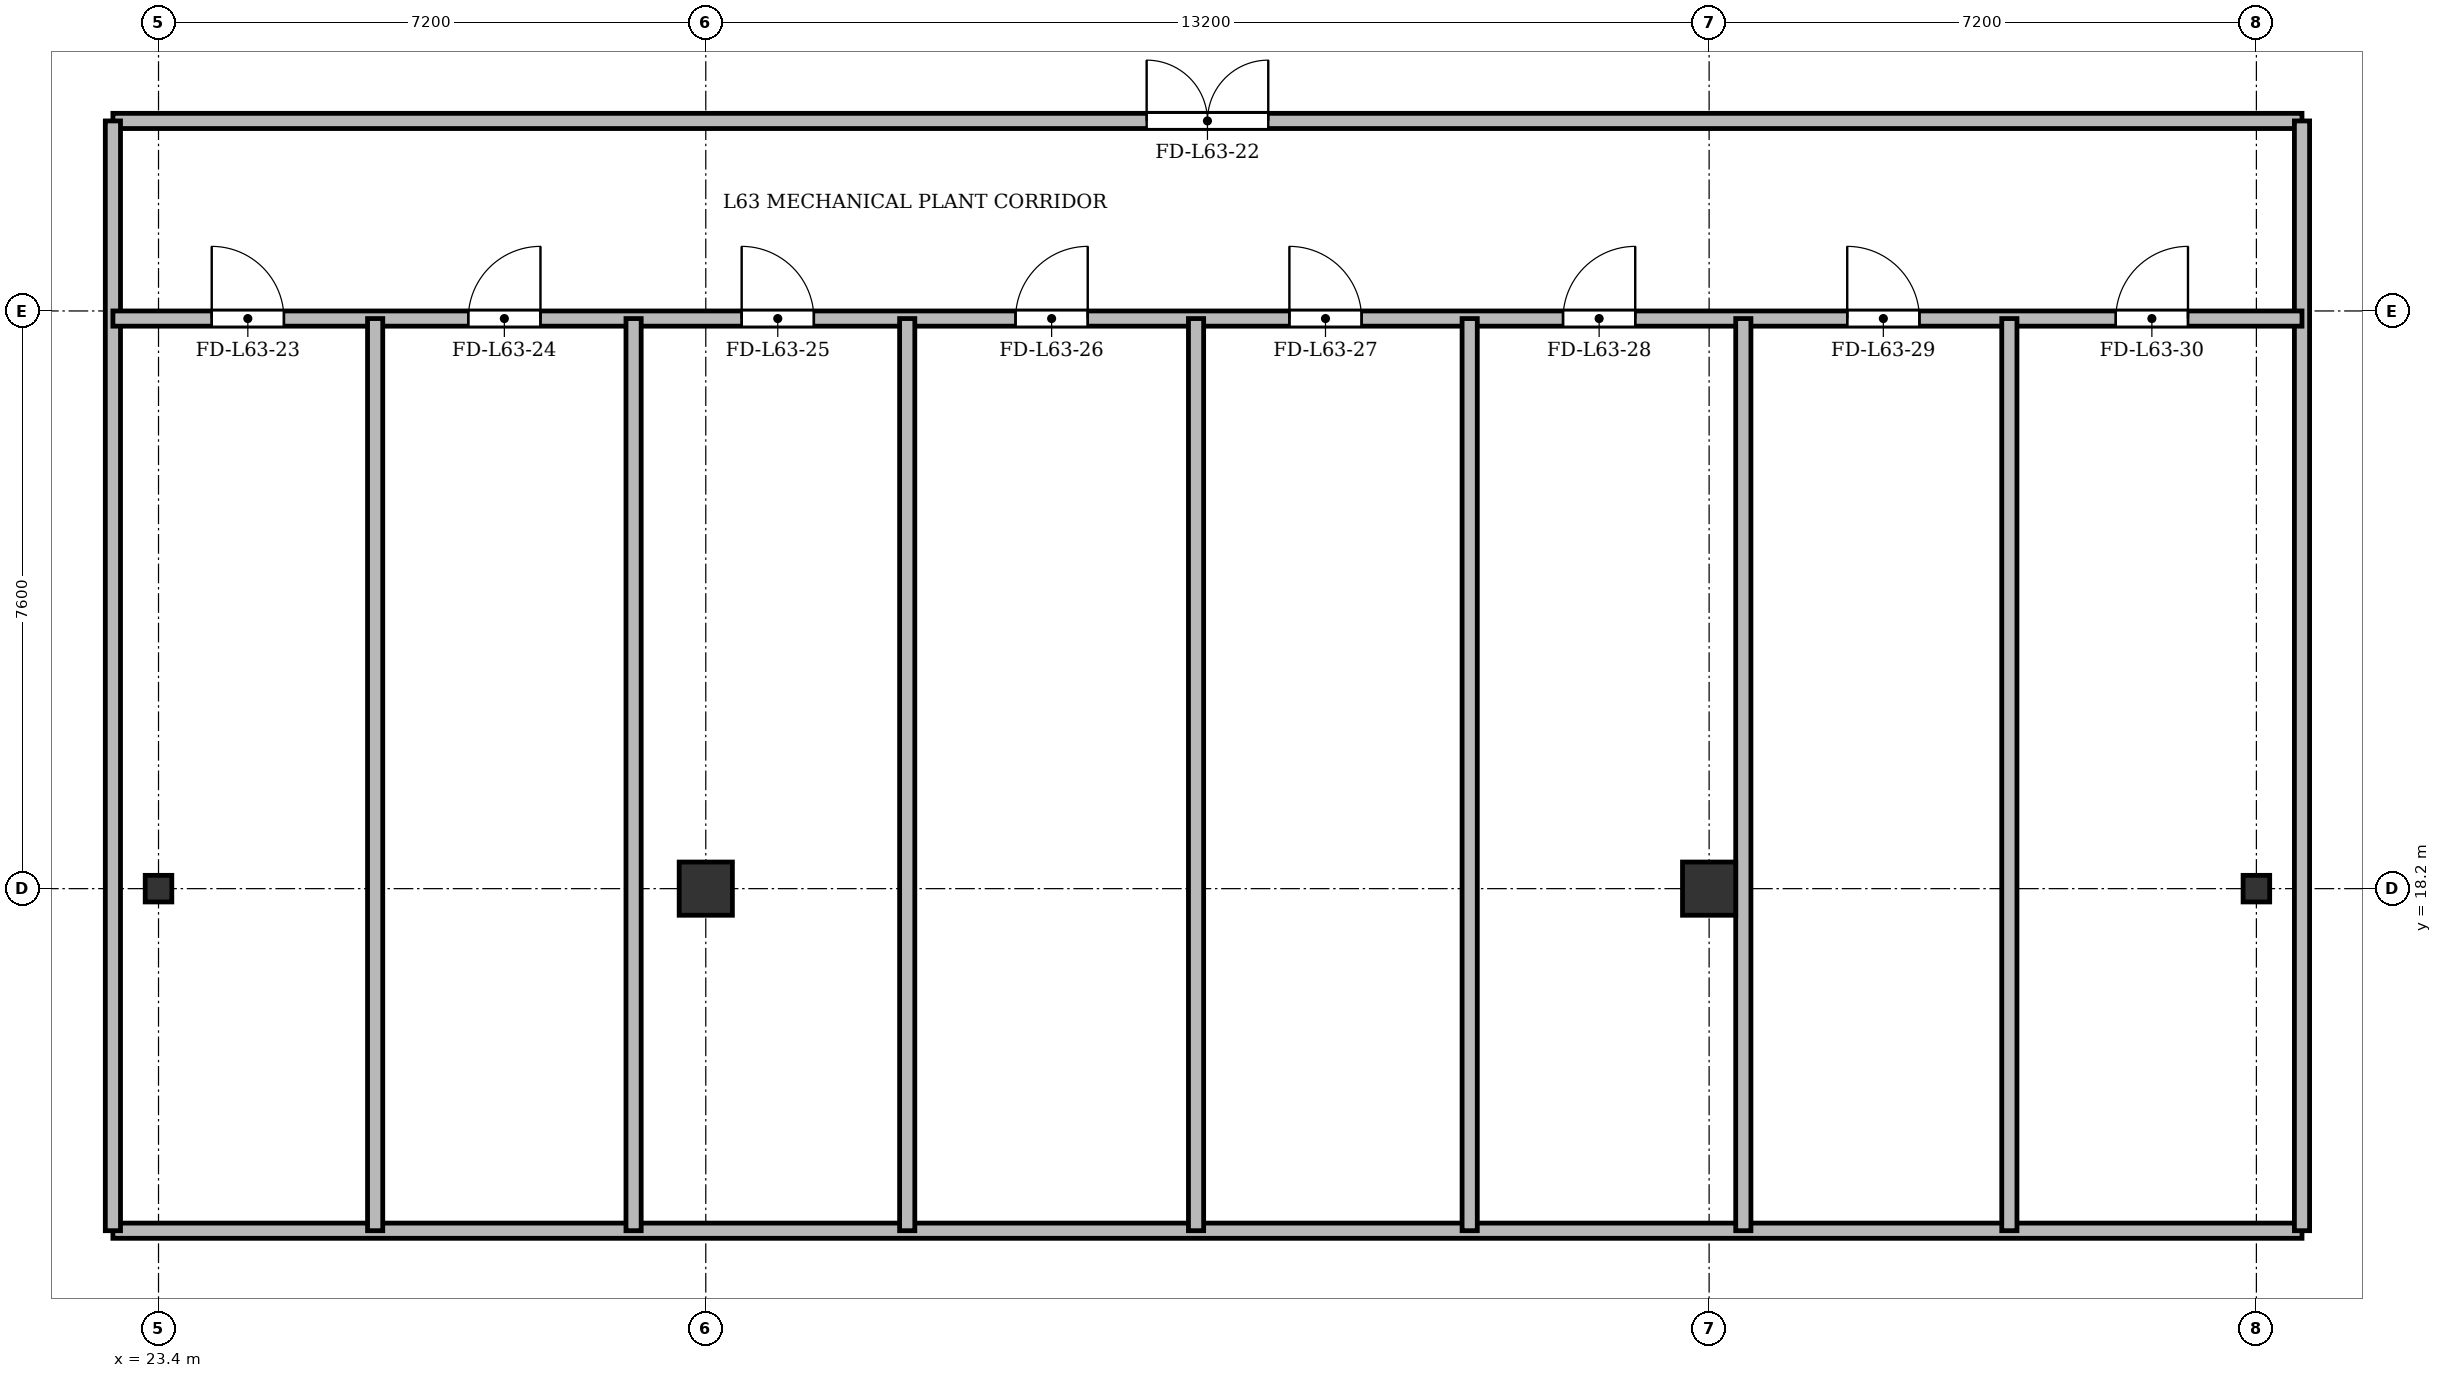
"""IFC4 building model, lengths in metres.
Left out: names, types, materials, properties, quantities, classifications, styles, units other than length and angle.
Written with IfcOpenShell. Run it as: python <this file> out.ifc"""

import sys

from ifc_helpers import new_model, si_unit, direction, frame, frame_2d, origin, origin_2d, place, context, subcontext, project, spatial, rectangle, i_section, extrude, source, transform, mapped, element, fill, save


model = new_model("IFC4")
c1 = context("Model", 3, precision=1e-05, world=origin(), true_north=direction((0.0, 1.0)))
c2 = subcontext(c1, "Body", "Model", "MODEL_VIEW")
j1 = project(units=[si_unit("LENGTHUNIT", "METRE"), si_unit("PLANEANGLEUNIT", "RADIAN")], contexts=[c1])
p1 = place(None, origin())
s1 = spatial("IfcSite", under=j1, at=p1, CompositionType="ELEMENT")
p2 = place(p1, origin())
s2 = spatial("IfcBuilding", under=s1, at=p2, CompositionType="ELEMENT")
p3 = place(p2, frame((0.0, 0.0, 240.9)))
s3 = spatial("IfcBuildingStorey", under=s2, at=p3, CompositionType="ELEMENT", Elevation=240.9)
m1 = source(origin(), c2, "Body", "SweptSolid", [
    extrude(i_section(OverallWidth=0.35, OverallDepth=0.35, WebThickness=0.018, FlangeThickness=0.028, at=origin_2d()), origin(), (0.0, 0.0, 1.0), 7.8),
])
p4 = place(p3, frame((23.4, 18.2, 0.0), z_axis=(0.0, 0.0, 1.0), x_axis=(1.0, 0.0, 0.0)))
e1 = element("IfcColumn", 1, at=p4, inside=s3, PredefinedType="COLUMN", context=c2, shape_type="MappedRepresentation", body=[
    mapped(m1, transform((0.0, 0.0, 0.0), x_axis=(1.0, 0.0, 0.0), y_axis=(0.0, 1.0, 0.0), z_axis=(0.0, 0.0, 1.0), scale=1.0)),
])
m2 = source(origin(), c2, "Body", "SweptSolid", [
    extrude(rectangle(XDim=0.7, YDim=0.7, at=origin_2d()), origin(), (0.0, 0.0, 1.0), 7.8),
])
for number, where, z_axis, x_axis in (
    (2, (30.6, 18.2, 0.0), (0.0, 0.0, 1.0), (1.0, 0.0, 0.0)),
    (3, (43.8, 18.2, 0.0), (0.0, 0.0, 1.0), (1.0, 0.0, 0.0)),
):
    element("IfcColumn", number, at=place(p3, frame(where, z_axis=z_axis, x_axis=x_axis)), inside=s3, PredefinedType="COLUMN", context=c2, shape_type="MappedRepresentation", body=[
        mapped(m2, transform((0.0, 0.0, 0.0), x_axis=(1.0, 0.0, 0.0), y_axis=(0.0, 1.0, 0.0), z_axis=(0.0, 0.0, 1.0), scale=1.0)),
    ])
p5 = place(p3, frame((51.0, 18.2, 0.0), z_axis=(0.0, 0.0, 1.0), x_axis=(1.0, 0.0, 0.0)))
e4 = element("IfcColumn", 4, at=p5, inside=s3, PredefinedType="COLUMN", context=c2, shape_type="MappedRepresentation", body=[
    mapped(m1, transform((0.0, 0.0, 0.0), x_axis=(1.0, 0.0, 0.0), y_axis=(0.0, 1.0, 0.0), z_axis=(0.0, 0.0, 1.0), scale=1.0)),
])
p6 = place(p3, frame((22.8, 28.3, 0.0), z_axis=(0.0, 0.0, 1.0), x_axis=(1.0, 0.0, 0.0)))
e5 = element("IfcWall", 5, at=p6, inside=s3, PredefinedType="PARTITIONING", context=c2, shape_type="SweptSolid", body=[
    extrude(rectangle(XDim=28.8, YDim=0.2, at=frame_2d((14.4, 0.0))), origin(), (0.0, 0.0, 1.0), 6.94),
])
p7 = place(p6, frame((13.6, 0.0, 0.0)))
e6 = element("IfcOpeningElement", 6, at=p7, cuts=e5, PredefinedType="OPENING", context=c2, shape_type="SweptSolid", body=[
    extrude(rectangle(XDim=1.6, YDim=2.2, at=frame_2d((0.8, 1.1))), frame((0.0, 0.11, 0.0), z_axis=(0.0, -1.0, 0.0), x_axis=(1.0, 0.0, 0.0)), (0.0, 0.0, 1.0), 0.22),
])
p8 = place(p3, frame((22.8, 13.7, 0.0), z_axis=(0.0, 0.0, 1.0), x_axis=(1.0, 0.0, 0.0)))
e7 = element("IfcWall", 7, at=p8, inside=s3, PredefinedType="PARTITIONING", context=c2, shape_type="SweptSolid", body=[
    extrude(rectangle(XDim=28.8, YDim=0.2, at=frame_2d((14.4, 0.0))), origin(), (0.0, 0.0, 1.0), 6.94),
])
for number, where, z_axis, x_axis in (
    (8, (22.8, 13.7, 0.0), (0.0, 0.0, 1.0), (0.0, 1.0, 0.0)),
    (9, (51.6, 13.7, 0.0), (0.0, 0.0, 1.0), (0.0, 1.0, 0.0)),
):
    element("IfcWall", number, at=place(p3, frame(where, z_axis=z_axis, x_axis=x_axis)), inside=s3, PredefinedType="PARTITIONING", context=c2, shape_type="SweptSolid", body=[
        extrude(rectangle(XDim=14.6, YDim=0.2, at=frame_2d((7.3, 0.0))), origin(), (0.0, 0.0, 1.0), 6.99),
    ])
p9 = place(p3, frame((22.8, 25.7, 0.0), z_axis=(0.0, 0.0, 1.0), x_axis=(1.0, 0.0, 0.0)))
e10 = element("IfcWall", 10, at=p9, inside=s3, PredefinedType="PARTITIONING", context=c2, shape_type="SweptSolid", body=[
    extrude(rectangle(XDim=28.8, YDim=0.2, at=frame_2d((14.4, 0.0))), origin(), (0.0, 0.0, 1.0), 6.94),
])
p10 = place(p9, frame((1.3, 0.0, 0.0)))
e11 = element("IfcOpeningElement", 11, at=p10, cuts=e10, PredefinedType="OPENING", context=c2, shape_type="SweptSolid", body=[
    extrude(rectangle(XDim=0.95, YDim=2.15, at=frame_2d((0.475, 1.075))), frame((0.0, 0.11, 0.0), z_axis=(0.0, -1.0, 0.0), x_axis=(1.0, 0.0, 0.0)), (0.0, 0.0, 1.0), 0.22),
])
p11 = place(p9, frame((4.675, 0.0, 0.0)))
e12 = element("IfcOpeningElement", 12, at=p11, cuts=e10, PredefinedType="OPENING", context=c2, shape_type="SweptSolid", body=[
    extrude(rectangle(XDim=0.95, YDim=2.15, at=frame_2d((0.475, 1.075))), frame((0.0, 0.11, 0.0), z_axis=(0.0, -1.0, 0.0), x_axis=(1.0, 0.0, 0.0)), (0.0, 0.0, 1.0), 0.22),
])
p12 = place(p9, frame((8.272, 0.0, 0.0)))
e13 = element("IfcOpeningElement", 13, at=p12, cuts=e10, PredefinedType="OPENING", context=c2, shape_type="SweptSolid", body=[
    extrude(rectangle(XDim=0.95, YDim=2.15, at=frame_2d((0.475, 1.075))), frame((0.0, 0.11, 0.0), z_axis=(0.0, -1.0, 0.0), x_axis=(1.0, 0.0, 0.0)), (0.0, 0.0, 1.0), 0.22),
])
p13 = place(p9, frame((11.875, 0.0, 0.0)))
e14 = element("IfcOpeningElement", 14, at=p13, cuts=e10, PredefinedType="OPENING", context=c2, shape_type="SweptSolid", body=[
    extrude(rectangle(XDim=0.95, YDim=2.15, at=frame_2d((0.475, 1.075))), frame((0.0, 0.11, 0.0), z_axis=(0.0, -1.0, 0.0), x_axis=(1.0, 0.0, 0.0)), (0.0, 0.0, 1.0), 0.22),
])
p14 = place(p9, frame((15.478, 0.0, 0.0)))
e15 = element("IfcOpeningElement", 15, at=p14, cuts=e10, PredefinedType="OPENING", context=c2, shape_type="SweptSolid", body=[
    extrude(rectangle(XDim=0.95, YDim=2.15, at=frame_2d((0.475, 1.075))), frame((0.0, 0.11, 0.0), z_axis=(0.0, -1.0, 0.0), x_axis=(1.0, 0.0, 0.0)), (0.0, 0.0, 1.0), 0.22),
])
p15 = place(p9, frame((19.078, 0.0, 0.0)))
e16 = element("IfcOpeningElement", 16, at=p15, cuts=e10, PredefinedType="OPENING", context=c2, shape_type="SweptSolid", body=[
    extrude(rectangle(XDim=0.95, YDim=2.15, at=frame_2d((0.475, 1.075))), frame((0.0, 0.11, 0.0), z_axis=(0.0, -1.0, 0.0), x_axis=(1.0, 0.0, 0.0)), (0.0, 0.0, 1.0), 0.22),
])
p16 = place(p9, frame((22.817, 0.0, 0.0)))
e17 = element("IfcOpeningElement", 17, at=p16, cuts=e10, PredefinedType="OPENING", context=c2, shape_type="SweptSolid", body=[
    extrude(rectangle(XDim=0.95, YDim=2.15, at=frame_2d((0.475, 1.075))), frame((0.0, 0.11, 0.0), z_axis=(0.0, -1.0, 0.0), x_axis=(1.0, 0.0, 0.0)), (0.0, 0.0, 1.0), 0.22),
])
p17 = place(p9, frame((26.35, 0.0, 0.0)))
e18 = element("IfcOpeningElement", 18, at=p17, cuts=e10, PredefinedType="OPENING", context=c2, shape_type="SweptSolid", body=[
    extrude(rectangle(XDim=0.95, YDim=2.15, at=frame_2d((0.475, 1.075))), frame((0.0, 0.11, 0.0), z_axis=(0.0, -1.0, 0.0), x_axis=(1.0, 0.0, 0.0)), (0.0, 0.0, 1.0), 0.22),
])
for number, where, z_axis, x_axis in (
    (19, (26.25, 13.7, 0.0), (0.0, 0.0, 1.0), (0.0, 1.0, 0.0)),
    (20, (29.65, 13.7, 0.0), (0.0, 0.0, 1.0), (0.0, 1.0, 0.0)),
    (21, (33.25, 13.7, 0.0), (0.0, 0.0, 1.0), (0.0, 1.0, 0.0)),
    (22, (37.05, 13.7, 0.0), (0.0, 0.0, 1.0), (0.0, 1.0, 0.0)),
    (23, (40.65, 13.7, 0.0), (0.0, 0.0, 1.0), (0.0, 1.0, 0.0)),
    (24, (44.25, 13.7, 0.0), (0.0, 0.0, 1.0), (0.0, 1.0, 0.0)),
    (25, (47.75, 13.7, 0.0), (0.0, 0.0, 1.0), (0.0, 1.0, 0.0)),
):
    element("IfcWall", number, at=place(p3, frame(where, z_axis=z_axis, x_axis=x_axis)), inside=s3, PredefinedType="PARTITIONING", context=c2, shape_type="SweptSolid", body=[
        extrude(rectangle(XDim=12.0, YDim=0.2, at=frame_2d((6.0, 0.0))), origin(), (0.0, 0.0, 1.0), 6.99),
    ])
m3 = source(origin(), c2, "Body", "SweptSolid", [
    extrude(rectangle(XDim=1.6, YDim=2.2, at=frame_2d((0.8, 1.1))), frame((0.0, 0.025, 0.0), z_axis=(0.0, -1.0, 0.0), x_axis=(1.0, 0.0, 0.0)), (0.0, 0.0, 1.0), 0.05),
])
p18 = place(p7, origin())
e26 = element("IfcDoor", 26, at=p18, inside=s3, OperationType="DOUBLE_DOOR_SINGLE_SWING", PredefinedType="DOOR", context=c2, shape_type="MappedRepresentation", body=[
    mapped(m3, transform((0.0, 0.0, 0.0), x_axis=(1.0, 0.0, 0.0), y_axis=(0.0, 1.0, 0.0), z_axis=(0.0, 0.0, 1.0), scale=1.0)),
])
fill(e6, e26)
m4 = source(origin(), c2, "Body", "SweptSolid", [
    extrude(rectangle(XDim=0.95, YDim=2.15, at=frame_2d((0.475, 1.075))), frame((0.0, 0.025, 0.0), z_axis=(0.0, -1.0, 0.0), x_axis=(1.0, 0.0, 0.0)), (0.0, 0.0, 1.0), 0.05),
])
p19 = place(p10, origin())
e27 = element("IfcDoor", 27, at=p19, inside=s3, OperationType="SINGLE_SWING_LEFT", PredefinedType="DOOR", context=c2, shape_type="MappedRepresentation", body=[
    mapped(m4, transform((0.0, 0.0, 0.0), x_axis=(1.0, 0.0, 0.0), y_axis=(0.0, 1.0, 0.0), z_axis=(0.0, 0.0, 1.0), scale=1.0)),
])
fill(e11, e27)
p20 = place(p11, origin())
e28 = element("IfcDoor", 28, at=p20, inside=s3, OperationType="SINGLE_SWING_RIGHT", PredefinedType="DOOR", context=c2, shape_type="MappedRepresentation", body=[
    mapped(m4, transform((0.0, 0.0, 0.0), x_axis=(1.0, 0.0, 0.0), y_axis=(0.0, 1.0, 0.0), z_axis=(0.0, 0.0, 1.0), scale=1.0)),
])
fill(e12, e28)
p21 = place(p12, origin())
e29 = element("IfcDoor", 29, at=p21, inside=s3, OperationType="SINGLE_SWING_LEFT", PredefinedType="DOOR", context=c2, shape_type="MappedRepresentation", body=[
    mapped(m4, transform((0.0, 0.0, 0.0), x_axis=(1.0, 0.0, 0.0), y_axis=(0.0, 1.0, 0.0), z_axis=(0.0, 0.0, 1.0), scale=1.0)),
])
fill(e13, e29)
p22 = place(p13, origin())
e30 = element("IfcDoor", 30, at=p22, inside=s3, OperationType="SINGLE_SWING_RIGHT", PredefinedType="DOOR", context=c2, shape_type="MappedRepresentation", body=[
    mapped(m4, transform((0.0, 0.0, 0.0), x_axis=(1.0, 0.0, 0.0), y_axis=(0.0, 1.0, 0.0), z_axis=(0.0, 0.0, 1.0), scale=1.0)),
])
fill(e14, e30)
p23 = place(p14, origin())
e31 = element("IfcDoor", 31, at=p23, inside=s3, OperationType="SINGLE_SWING_LEFT", PredefinedType="DOOR", context=c2, shape_type="MappedRepresentation", body=[
    mapped(m4, transform((0.0, 0.0, 0.0), x_axis=(1.0, 0.0, 0.0), y_axis=(0.0, 1.0, 0.0), z_axis=(0.0, 0.0, 1.0), scale=1.0)),
])
fill(e15, e31)
p24 = place(p15, origin())
e32 = element("IfcDoor", 32, at=p24, inside=s3, OperationType="SINGLE_SWING_RIGHT", PredefinedType="DOOR", context=c2, shape_type="MappedRepresentation", body=[
    mapped(m4, transform((0.0, 0.0, 0.0), x_axis=(1.0, 0.0, 0.0), y_axis=(0.0, 1.0, 0.0), z_axis=(0.0, 0.0, 1.0), scale=1.0)),
])
fill(e16, e32)
p25 = place(p16, origin())
e33 = element("IfcDoor", 33, at=p25, inside=s3, OperationType="SINGLE_SWING_LEFT", PredefinedType="DOOR", context=c2, shape_type="MappedRepresentation", body=[
    mapped(m4, transform((0.0, 0.0, 0.0), x_axis=(1.0, 0.0, 0.0), y_axis=(0.0, 1.0, 0.0), z_axis=(0.0, 0.0, 1.0), scale=1.0)),
])
fill(e17, e33)
p26 = place(p17, origin())
e34 = element("IfcDoor", 34, at=p26, inside=s3, OperationType="SINGLE_SWING_RIGHT", PredefinedType="DOOR", context=c2, shape_type="MappedRepresentation", body=[
    mapped(m4, transform((0.0, 0.0, 0.0), x_axis=(1.0, 0.0, 0.0), y_axis=(0.0, 1.0, 0.0), z_axis=(0.0, 0.0, 1.0), scale=1.0)),
])
fill(e18, e34)
save(model, sys.argv[1])
